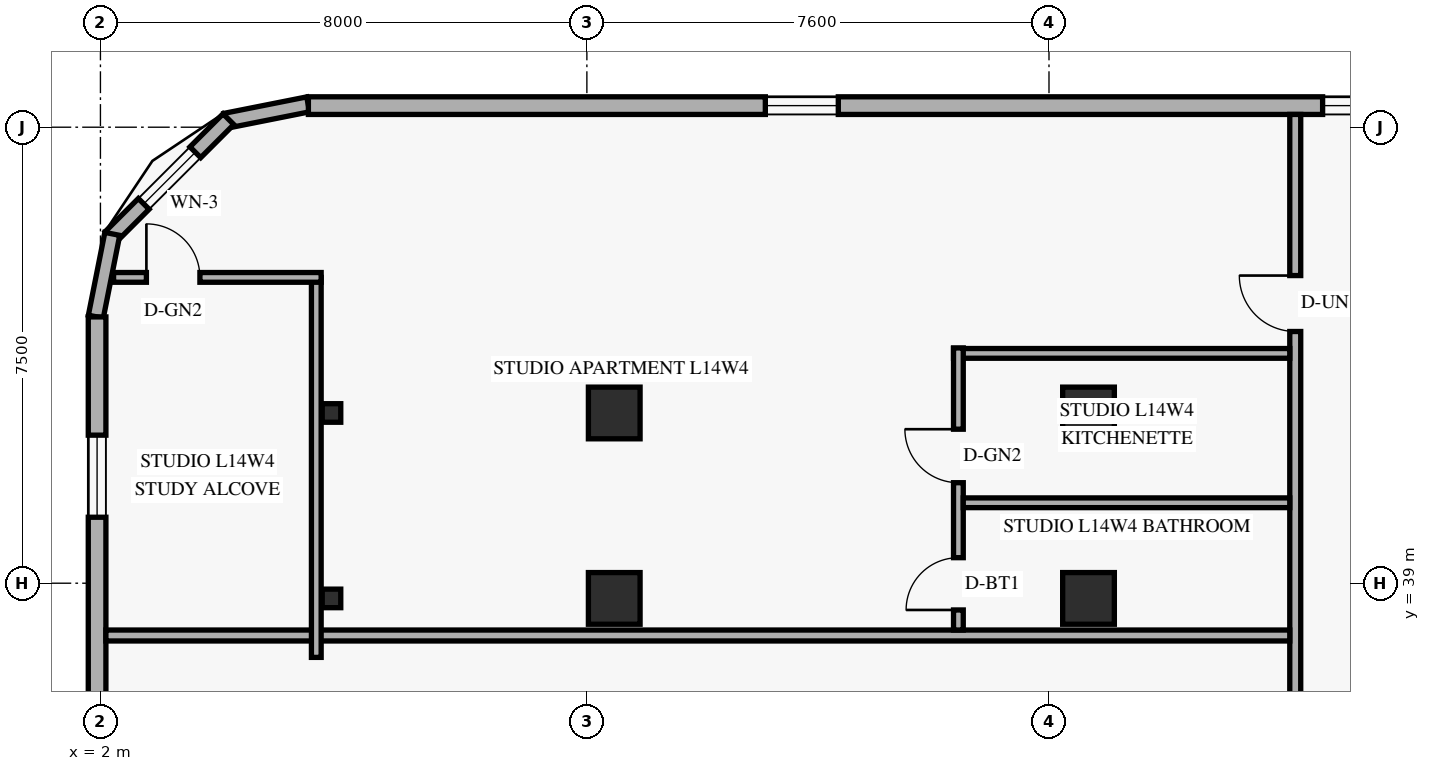
"""IFC4 building model, lengths in metres.
Left out: names, types, materials, properties, quantities, classifications, styles, units other than length and angle.
Written with IfcOpenShell. Run it as: python <this file> out.ifc"""

import sys

from ifc_helpers import new_model, si_unit, direction, frame, frame_2d, origin, origin_2d, place, context, subcontext, project, spatial, rectangle, hollow_rectangle, extrude, element, fill, save


model = new_model("IFC4")
c1 = context("Model", 3, precision=1e-05, world=origin(), true_north=direction((0.0, 1.0)))
c2 = subcontext(c1, "Body", "Model", "MODEL_VIEW")
j1 = project(units=[si_unit("LENGTHUNIT", "METRE"), si_unit("PLANEANGLEUNIT", "RADIAN")], contexts=[c1])
p1 = place(None, origin())
s1 = spatial("IfcSite", under=j1, at=p1, CompositionType="ELEMENT")
p2 = place(p1, origin())
s2 = spatial("IfcBuilding", under=s1, at=p2, CompositionType="ELEMENT")
p3 = place(p2, frame((0.0, 0.0, 56.4)))
s3 = spatial("IfcBuildingStorey", under=s2, at=p3, CompositionType="ELEMENT", Elevation=56.4)
for number, where, z_axis, x_axis in (
    (1, (5.8, 38.75, 0.0), (0.0, 0.0, 1.0), (1.0, 0.0, 0.0)),
    (2, (5.8, 41.8, 0.0), (0.0, 0.0, 1.0), (1.0, 0.0, 0.0)),
):
    element("IfcColumn", number, at=place(p3, frame(where, z_axis=z_axis, x_axis=x_axis)), inside=s3, PredefinedType="COLUMN", context=c2, shape_type="SweptSolid", body=[
        extrude(hollow_rectangle(XDim=0.305, YDim=0.305, WallThickness=0.013, at=origin_2d()), origin(), (0.0, 0.0, 1.0), 3.6),
    ])
for number, where, z_axis, x_axis in (
    (3, (10.45, 38.75, 0.0), (0.0, 0.0, 1.0), (1.0, 0.0, 0.0)),
    (4, (10.45, 41.8, 0.0), (0.0, 0.0, 1.0), (1.0, 0.0, 0.0)),
    (5, (18.25, 38.75, 0.0), (0.0, 0.0, 1.0), (1.0, 0.0, 0.0)),
    (6, (18.25, 41.8, 0.0), (0.0, 0.0, 1.0), (1.0, 0.0, 0.0)),
):
    element("IfcColumn", number, at=place(p3, frame(where, z_axis=z_axis, x_axis=x_axis)), inside=s3, PredefinedType="COLUMN", context=c2, shape_type="SweptSolid", body=[
        extrude(rectangle(XDim=0.85, YDim=0.85, at=origin_2d()), origin(), (0.0, 0.0, 1.0), 3.6),
    ])
p4 = place(p3, frame((5.417, 46.876, 0.0), z_axis=(0.0, 0.0, 1.0), x_axis=(-0.980809899341, -0.19496651342, 0.0)))
e7 = element("IfcWall", 7, at=p4, inside=s3, PredefinedType="SOLIDWALL", context=c2, shape_type="SweptSolid", body=[
    extrude(rectangle(XDim=1.389, YDim=0.25, at=frame_2d((0.694, 0.0))), origin(), (0.0, 0.0, 1.0), 3.35),
])
p5 = place(p3, frame((4.105, 46.632, 0.0), z_axis=(0.0, 0.0, 1.0), x_axis=(-0.707106781187, -0.707106781187, 0.0)))
e8 = element("IfcWall", 8, at=p5, inside=s3, PredefinedType="SOLIDWALL", context=c2, shape_type="SweptSolid", body=[
    extrude(rectangle(XDim=2.739, YDim=0.25, at=frame_2d((1.37, 0.0))), origin(), (0.0, 0.0, 1.0), 3.35),
])
p6 = place(p5, frame((0.77, 0.0, 0.85)))
e9 = element("IfcOpeningElement", 9, at=p6, cuts=e8, PredefinedType="OPENING", context=c2, shape_type="SweptSolid", body=[
    extrude(rectangle(XDim=1.2, YDim=1.5, at=frame_2d((0.6, 0.75))), frame((0.0, 0.135, 0.0), z_axis=(0.0, -1.0, 0.0), x_axis=(1.0, 0.0, 0.0)), (0.0, 0.0, 1.0), 0.27),
])
p7 = place(p3, frame((2.195, 44.746, 0.0), z_axis=(0.0, 0.0, 1.0), x_axis=(-0.19496651342, -0.980809899341, 0.0)))
e10 = element("IfcWall", 10, at=p7, inside=s3, PredefinedType="SOLIDWALL", context=c2, shape_type="SweptSolid", body=[
    extrude(rectangle(XDim=1.389, YDim=0.25, at=frame_2d((0.694, 0.0))), origin(), (0.0, 0.0, 1.0), 3.35),
])
p8 = place(p3, frame((44.98, 46.855, 0.0), z_axis=(0.0, 0.0, 1.0), x_axis=(-1.0, 0.0, 0.0)))
e11 = element("IfcWall", 11, at=p8, inside=s3, PredefinedType="SOLIDWALL", context=c2, shape_type="SweptSolid", body=[
    extrude(rectangle(XDim=39.56, YDim=0.29, at=frame_2d((19.78, 0.0))), origin(), (0.0, 0.0, 1.0), 3.35),
])
p9 = place(p8, frame((30.845, 0.0, 0.85)))
e12 = element("IfcOpeningElement", 12, at=p9, cuts=e11, PredefinedType="OPENING", context=c2, shape_type="SweptSolid", body=[
    extrude(rectangle(XDim=1.2, YDim=1.5, at=frame_2d((0.6, 0.75))), frame((0.0, 0.155, 0.0), z_axis=(0.0, -1.0, 0.0), x_axis=(1.0, 0.0, 0.0)), (0.0, 0.0, 1.0), 0.31),
])
p10 = place(p8, frame((21.68, 0.0, 0.85)))
e13 = element("IfcOpeningElement", 13, at=p10, cuts=e11, PredefinedType="OPENING", context=c2, shape_type="SweptSolid", body=[
    extrude(rectangle(XDim=1.2, YDim=1.5, at=frame_2d((0.6, 0.75))), frame((0.0, 0.155, 0.0), z_axis=(0.0, -1.0, 0.0), x_axis=(1.0, 0.0, 0.0)), (0.0, 0.0, 1.0), 0.31),
])
p11 = place(p8, frame((17.829, 0.0, 0.85)))
e14 = element("IfcOpeningElement", 14, at=p11, cuts=e11, PredefinedType="OPENING", context=c2, shape_type="SweptSolid", body=[
    extrude(rectangle(XDim=1.2, YDim=1.5, at=frame_2d((0.6, 0.75))), frame((0.0, 0.155, 0.0), z_axis=(0.0, -1.0, 0.0), x_axis=(1.0, 0.0, 0.0)), (0.0, 0.0, 1.0), 0.31),
])
p12 = place(p8, frame((11.994, 0.0, 0.85)))
e15 = element("IfcOpeningElement", 15, at=p12, cuts=e11, PredefinedType="OPENING", context=c2, shape_type="SweptSolid", body=[
    extrude(rectangle(XDim=1.2, YDim=1.5, at=frame_2d((0.6, 0.75))), frame((0.0, 0.155, 0.0), z_axis=(0.0, -1.0, 0.0), x_axis=(1.0, 0.0, 0.0)), (0.0, 0.0, 1.0), 0.31),
])
p13 = place(p8, frame((7.895, 0.0, 0.85)))
e16 = element("IfcOpeningElement", 16, at=p13, cuts=e11, PredefinedType="OPENING", context=c2, shape_type="SweptSolid", body=[
    extrude(rectangle(XDim=1.2, YDim=1.5, at=frame_2d((0.6, 0.75))), frame((0.0, 0.155, 0.0), z_axis=(0.0, -1.0, 0.0), x_axis=(1.0, 0.0, 0.0)), (0.0, 0.0, 1.0), 0.31),
])
p14 = place(p8, frame((4.083, 0.0, 0.85)))
e17 = element("IfcOpeningElement", 17, at=p14, cuts=e11, PredefinedType="OPENING", context=c2, shape_type="SweptSolid", body=[
    extrude(rectangle(XDim=1.2, YDim=1.5, at=frame_2d((0.6, 0.75))), frame((0.0, 0.155, 0.0), z_axis=(0.0, -1.0, 0.0), x_axis=(1.0, 0.0, 0.0)), (0.0, 0.0, 1.0), 0.31),
])
p15 = place(p8, frame((0.367, 0.0, 0.85)))
e18 = element("IfcOpeningElement", 18, at=p15, cuts=e11, PredefinedType="OPENING", context=c2, shape_type="SweptSolid", body=[
    extrude(rectangle(XDim=1.2, YDim=1.5, at=frame_2d((0.6, 0.75))), frame((0.0, 0.155, 0.0), z_axis=(0.0, -1.0, 0.0), x_axis=(1.0, 0.0, 0.0)), (0.0, 0.0, 1.0), 0.31),
])
p16 = place(p3, frame((1.945, 43.38, 0.0), z_axis=(0.0, 0.0, 1.0), x_axis=(0.0, -1.0, 0.0)))
e19 = element("IfcWall", 19, at=p16, inside=s3, PredefinedType="SOLIDWALL", context=c2, shape_type="SweptSolid", body=[
    extrude(rectangle(XDim=38.76, YDim=0.29, at=frame_2d((19.38, 0.0))), origin(), (0.0, 0.0, 1.0), 3.35),
])
p17 = place(p16, frame((35.212, 0.0, 0.85)))
e20 = element("IfcOpeningElement", 20, at=p17, cuts=e19, PredefinedType="OPENING", context=c2, shape_type="SweptSolid", body=[
    extrude(rectangle(XDim=1.35, YDim=1.55, at=frame_2d((0.675, 0.775))), frame((0.0, 0.155, 0.0), z_axis=(0.0, -1.0, 0.0), x_axis=(1.0, 0.0, 0.0)), (0.0, 0.0, 1.0), 0.31),
])
p18 = place(p16, frame((27.677, 0.0, 0.85)))
e21 = element("IfcOpeningElement", 21, at=p18, cuts=e19, PredefinedType="OPENING", context=c2, shape_type="SweptSolid", body=[
    extrude(rectangle(XDim=1.35, YDim=1.55, at=frame_2d((0.675, 0.775))), frame((0.0, 0.155, 0.0), z_axis=(0.0, -1.0, 0.0), x_axis=(1.0, 0.0, 0.0)), (0.0, 0.0, 1.0), 0.31),
])
p19 = place(p16, frame((18.19, 0.0, 0.85)))
e22 = element("IfcOpeningElement", 22, at=p19, cuts=e19, PredefinedType="OPENING", context=c2, shape_type="SweptSolid", body=[
    extrude(rectangle(XDim=1.35, YDim=1.55, at=frame_2d((0.675, 0.775))), frame((0.0, 0.155, 0.0), z_axis=(0.0, -1.0, 0.0), x_axis=(1.0, 0.0, 0.0)), (0.0, 0.0, 1.0), 0.31),
])
p20 = place(p16, frame((8.965, 0.0, 0.85)))
e23 = element("IfcOpeningElement", 23, at=p20, cuts=e19, PredefinedType="OPENING", context=c2, shape_type="SweptSolid", body=[
    extrude(rectangle(XDim=1.35, YDim=1.55, at=frame_2d((0.675, 0.775))), frame((0.0, 0.155, 0.0), z_axis=(0.0, -1.0, 0.0), x_axis=(1.0, 0.0, 0.0)), (0.0, 0.0, 1.0), 0.31),
])
p21 = place(p16, frame((1.945, 0.0, 0.85)))
e24 = element("IfcOpeningElement", 24, at=p21, cuts=e19, PredefinedType="OPENING", context=c2, shape_type="SweptSolid", body=[
    extrude(rectangle(XDim=1.35, YDim=1.55, at=frame_2d((0.675, 0.775))), frame((0.0, 0.155, 0.0), z_axis=(0.0, -1.0, 0.0), x_axis=(1.0, 0.0, 0.0)), (0.0, 0.0, 1.0), 0.31),
])
p22 = place(p3, frame((21.65, 1.29, 0.0), z_axis=(0.0, 0.0, 1.0), x_axis=(0.0, 1.0, 0.0)))
e25 = element("IfcWall", 25, at=p22, inside=s3, PredefinedType="STANDARD", context=c2, shape_type="SweptSolid", body=[
    extrude(rectangle(XDim=45.42, YDim=0.18, at=frame_2d((22.71, 0.0))), origin(), (0.0, 0.0, 1.0), 2.639),
])
p23 = place(p22, frame((3.135, 0.0, 0.0)))
e26 = element("IfcOpeningElement", 26, at=p23, cuts=e25, PredefinedType="OPENING", context=c2, shape_type="SweptSolid", body=[
    extrude(rectangle(XDim=0.92, YDim=2.15, at=frame_2d((0.46, 1.075))), frame((0.0, 0.1, 0.0), z_axis=(0.0, -1.0, 0.0), x_axis=(1.0, 0.0, 0.0)), (0.0, 0.0, 1.0), 0.2),
])
p24 = place(p22, frame((13.975, 0.0, 0.0)))
e27 = element("IfcOpeningElement", 27, at=p24, cuts=e25, PredefinedType="OPENING", context=c2, shape_type="SweptSolid", body=[
    extrude(rectangle(XDim=0.92, YDim=2.15, at=frame_2d((0.46, 1.075))), frame((0.0, 0.1, 0.0), z_axis=(0.0, -1.0, 0.0), x_axis=(1.0, 0.0, 0.0)), (0.0, 0.0, 1.0), 0.2),
])
p25 = place(p22, frame((20.91, 0.0, 0.0)))
e28 = element("IfcOpeningElement", 28, at=p25, cuts=e25, PredefinedType="OPENING", context=c2, shape_type="SweptSolid", body=[
    extrude(rectangle(XDim=0.95, YDim=2.15, at=frame_2d((0.475, 1.075))), frame((0.0, 0.1, 0.0), z_axis=(0.0, -1.0, 0.0), x_axis=(1.0, 0.0, 0.0)), (0.0, 0.0, 1.0), 0.2),
])
p26 = place(p22, frame((32.95, 0.0, 0.0)))
e29 = element("IfcOpeningElement", 29, at=p26, cuts=e25, PredefinedType="OPENING", context=c2, shape_type="SweptSolid", body=[
    extrude(rectangle(XDim=0.92, YDim=2.15, at=frame_2d((0.46, 1.075))), frame((0.0, 0.1, 0.0), z_axis=(0.0, -1.0, 0.0), x_axis=(1.0, 0.0, 0.0)), (0.0, 0.0, 1.0), 0.2),
])
p27 = place(p22, frame((41.85, 0.0, 0.0)))
e30 = element("IfcOpeningElement", 30, at=p27, cuts=e25, PredefinedType="OPENING", context=c2, shape_type="SweptSolid", body=[
    extrude(rectangle(XDim=0.92, YDim=2.15, at=frame_2d((0.46, 1.075))), frame((0.0, 0.1, 0.0), z_axis=(0.0, -1.0, 0.0), x_axis=(1.0, 0.0, 0.0)), (0.0, 0.0, 1.0), 0.2),
])
p28 = place(p3, frame((2.09, 38.14, 0.0), z_axis=(0.0, 0.0, 1.0), x_axis=(1.0, 0.0, 0.0)))
e31 = element("IfcWall", 31, at=p28, inside=s3, PredefinedType="PARTITIONING", context=c2, shape_type="SweptSolid", body=[
    extrude(rectangle(XDim=19.47, YDim=0.18, at=frame_2d((9.735, 0.0))), origin(), (0.0, 0.0, 1.0), 2.639),
])
p29 = place(p3, frame((16.03, 42.78, 0.0), z_axis=(0.0, 0.0, 1.0), x_axis=(1.0, 0.0, 0.0)))
e32 = element("IfcWall", 32, at=p29, inside=s3, PredefinedType="PLUMBINGWALL", context=c2, shape_type="SweptSolid", body=[
    extrude(rectangle(XDim=5.53, YDim=0.16, at=frame_2d((2.765, 0.0))), origin(), (0.0, 0.0, 1.0), 3.35),
])
p30 = place(p3, frame((16.11, 38.23, 0.0), z_axis=(0.0, 0.0, 1.0), x_axis=(0.0, 1.0, 0.0)))
e33 = element("IfcWall", 33, at=p30, inside=s3, PredefinedType="PLUMBINGWALL", context=c2, shape_type="SweptSolid", body=[
    extrude(rectangle(XDim=4.64, YDim=0.16, at=frame_2d((2.32, 0.0))), origin(), (0.0, 0.0, 1.0), 2.639),
])
p31 = place(p30, frame((0.33, 0.0, 0.0)))
e34 = element("IfcOpeningElement", 34, at=p31, cuts=e33, PredefinedType="OPENING", context=c2, shape_type="SweptSolid", body=[
    extrude(rectangle(XDim=0.86, YDim=2.12, at=frame_2d((0.43, 1.06))), frame((0.0, 0.09, 0.0), z_axis=(0.0, -1.0, 0.0), x_axis=(1.0, 0.0, 0.0)), (0.0, 0.0, 1.0), 0.18),
])
p32 = place(p30, frame((2.423, 0.0, 0.0)))
e35 = element("IfcOpeningElement", 35, at=p32, cuts=e33, PredefinedType="OPENING", context=c2, shape_type="SweptSolid", body=[
    extrude(rectangle(XDim=0.88, YDim=2.12, at=frame_2d((0.44, 1.06))), frame((0.0, 0.09, 0.0), z_axis=(0.0, -1.0, 0.0), x_axis=(1.0, 0.0, 0.0)), (0.0, 0.0, 1.0), 0.18),
])
p33 = place(p3, frame((16.19, 40.323, 0.0), z_axis=(0.0, 0.0, 1.0), x_axis=(1.0, 0.0, 0.0)))
e36 = element("IfcWall", 36, at=p33, inside=s3, PredefinedType="PLUMBINGWALL", context=c2, shape_type="SweptSolid", body=[
    extrude(rectangle(XDim=5.37, YDim=0.16, at=frame_2d((2.685, 0.0))), origin(), (0.0, 0.0, 1.0), 2.639),
])
p34 = place(p3, frame((5.55, 37.78, 0.0), z_axis=(0.0, 0.0, 1.0), x_axis=(0.0, 1.0, 0.0)))
e37 = element("IfcWall", 37, at=p34, inside=s3, PredefinedType="PARTITIONING", context=c2, shape_type="SweptSolid", body=[
    extrude(rectangle(XDim=6.25, YDim=0.16, at=frame_2d((3.125, 0.0))), origin(), (0.0, 0.0, 1.0), 3.35),
])
p35 = place(p3, frame((2.216, 44.03, 0.0), z_axis=(0.0, 0.0, 1.0), x_axis=(1.0, 0.0, 0.0)))
e38 = element("IfcWall", 38, at=p35, inside=s3, PredefinedType="PARTITIONING", context=c2, shape_type="SweptSolid", body=[
    extrude(rectangle(XDim=3.414, YDim=0.16, at=frame_2d((1.707, 0.0))), origin(), (0.0, 0.0, 1.0), 3.35),
])
p36 = place(p35, frame((0.54, 0.0, 0.0)))
e39 = element("IfcOpeningElement", 39, at=p36, cuts=e38, PredefinedType="OPENING", context=c2, shape_type="SweptSolid", body=[
    extrude(rectangle(XDim=0.88, YDim=2.12, at=frame_2d((0.44, 1.06))), frame((0.0, 0.09, 0.0), z_axis=(0.0, -1.0, 0.0), x_axis=(1.0, 0.0, 0.0)), (0.0, 0.0, 1.0), 0.18),
])
p37 = place(p6, origin())
e40 = element("IfcWindow", 40, at=p37, inside=s3, PartitioningType="SINGLE_PANEL", PredefinedType="WINDOW", context=c2, shape_type="SweptSolid", body=[
    extrude(rectangle(XDim=1.2, YDim=1.5, at=frame_2d((0.6, 0.75))), frame((0.0, 0.03, 0.0), z_axis=(0.0, -1.0, 0.0), x_axis=(1.0, 0.0, 0.0)), (0.0, 0.0, 1.0), 0.06),
])
fill(e9, e40)
p38 = place(p9, origin())
e41 = element("IfcWindow", 41, at=p38, inside=s3, PartitioningType="SINGLE_PANEL", PredefinedType="WINDOW", context=c2, shape_type="SweptSolid", body=[
    extrude(rectangle(XDim=1.2, YDim=1.5, at=frame_2d((0.6, 0.75))), frame((0.0, 0.03, 0.0), z_axis=(0.0, -1.0, 0.0), x_axis=(1.0, 0.0, 0.0)), (0.0, 0.0, 1.0), 0.06),
])
fill(e12, e41)
p39 = place(p10, origin())
e42 = element("IfcWindow", 42, at=p39, inside=s3, PartitioningType="SINGLE_PANEL", PredefinedType="WINDOW", context=c2, shape_type="SweptSolid", body=[
    extrude(rectangle(XDim=1.2, YDim=1.5, at=frame_2d((0.6, 0.75))), frame((0.0, 0.03, 0.0), z_axis=(0.0, -1.0, 0.0), x_axis=(1.0, 0.0, 0.0)), (0.0, 0.0, 1.0), 0.06),
])
fill(e13, e42)
p40 = place(p21, origin())
e43 = element("IfcWindow", 43, at=p40, inside=s3, PartitioningType="SINGLE_PANEL", PredefinedType="WINDOW", context=c2, shape_type="SweptSolid", body=[
    extrude(rectangle(XDim=1.35, YDim=1.55, at=frame_2d((0.675, 0.775))), frame((0.0, 0.03, 0.0), z_axis=(0.0, -1.0, 0.0), x_axis=(1.0, 0.0, 0.0)), (0.0, 0.0, 1.0), 0.06),
])
fill(e24, e43)
p41 = place(p36, origin())
e44 = element("IfcDoor", 44, at=p41, inside=s3, OperationType="SINGLE_SWING_LEFT", PredefinedType="DOOR", context=c2, shape_type="SweptSolid", body=[
    extrude(rectangle(XDim=0.88, YDim=2.12, at=frame_2d((0.44, 1.06))), frame((0.0, 0.025, 0.0), z_axis=(0.0, -1.0, 0.0), x_axis=(1.0, 0.0, 0.0)), (0.0, 0.0, 1.0), 0.05),
])
fill(e39, e44)
p42 = place(p27, origin())
e45 = element("IfcDoor", 45, at=p42, inside=s3, OperationType="SINGLE_SWING_RIGHT", PredefinedType="DOOR", context=c2, shape_type="SweptSolid", body=[
    extrude(rectangle(XDim=0.92, YDim=2.15, at=frame_2d((0.46, 1.075))), frame((0.0, 0.025, 0.0), z_axis=(0.0, -1.0, 0.0), x_axis=(1.0, 0.0, 0.0)), (0.0, 0.0, 1.0), 0.05),
])
fill(e30, e45)
p43 = place(p31, origin())
e46 = element("IfcDoor", 46, at=p43, inside=s3, OperationType="SINGLE_SWING_LEFT", PredefinedType="DOOR", context=c2, shape_type="SweptSolid", body=[
    extrude(rectangle(XDim=0.86, YDim=2.12, at=frame_2d((0.43, 1.06))), frame((0.0, 0.025, 0.0), z_axis=(0.0, -1.0, 0.0), x_axis=(1.0, 0.0, 0.0)), (0.0, 0.0, 1.0), 0.05),
])
fill(e34, e46)
p44 = place(p32, origin())
e47 = element("IfcDoor", 47, at=p44, inside=s3, OperationType="SINGLE_SWING_RIGHT", PredefinedType="DOOR", context=c2, shape_type="SweptSolid", body=[
    extrude(rectangle(XDim=0.88, YDim=2.12, at=frame_2d((0.44, 1.06))), frame((0.0, 0.025, 0.0), z_axis=(0.0, -1.0, 0.0), x_axis=(1.0, 0.0, 0.0)), (0.0, 0.0, 1.0), 0.05),
])
fill(e35, e47)
save(model, sys.argv[1])
